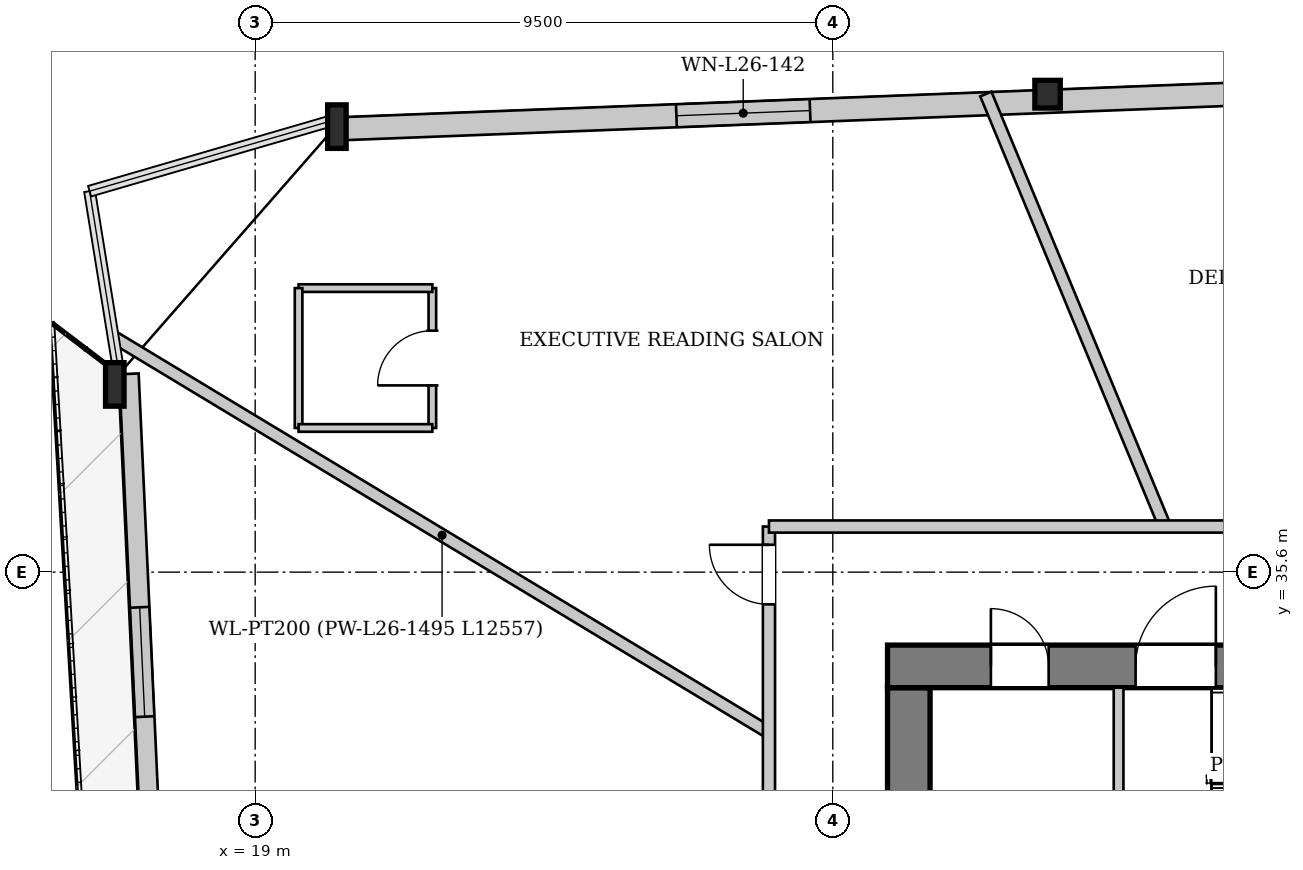
"""IFC4 building model, lengths in metres.
Left out: names, types, materials, properties, quantities, classifications, styles, units other than length and angle.
Written with IfcOpenShell. Run it as: python <this file> out.ifc"""

import sys

from ifc_helpers import new_model, si_unit, direction, frame, frame_2d, origin, origin_2d, place, context, subcontext, project, spatial, rectangle, i_section, extrude, source, transform, mapped, element, fill, save


model = new_model("IFC4")
c1 = context("Model", 3, precision=1e-05, world=origin(), true_north=direction((0.0, 1.0)))
c2 = subcontext(c1, "Body", "Model", "MODEL_VIEW")
j1 = project(units=[si_unit("LENGTHUNIT", "METRE"), si_unit("PLANEANGLEUNIT", "RADIAN")], contexts=[c1])
p1 = place(None, origin())
s1 = spatial("IfcSite", under=j1, at=p1, CompositionType="ELEMENT")
p2 = place(p1, origin())
s2 = spatial("IfcBuilding", under=s1, at=p2, CompositionType="ELEMENT")
p3 = place(p2, frame((0.0, 0.0, 102.15)))
s3 = spatial("IfcBuildingStorey", under=s2, at=p3, CompositionType="ELEMENT", Elevation=102.15)
m1 = source(origin(), c2, "Body", "SweptSolid", [
    extrude(i_section(OverallWidth=0.418, OverallDepth=0.455, WebThickness=0.038, FlangeThickness=0.059, at=origin_2d()), origin(), (0.0, 0.0, 1.0), 3.399),
])
p4 = place(p3, frame((32.167, 43.537, 0.0), z_axis=(-0.079291660334, -0.045463424811, 0.995814194318), x_axis=(0.497407768094, -0.86751686568, 0.0)))
e1 = element("IfcColumn", 1, at=p4, inside=s3, PredefinedType="COLUMN", context=c2, shape_type="MappedRepresentation", body=[
    mapped(m1, transform((0.0, 0.0, 0.0), x_axis=(1.0, 0.0, 0.0), y_axis=(0.0, 1.0, 0.0), z_axis=(0.0, 0.0, 1.0), scale=1.0)),
])
m2 = source(origin(), c2, "Body", "SweptSolid", [
    extrude(i_section(OverallWidth=0.304, OverallDepth=0.716, WebThickness=0.021, FlangeThickness=0.04, at=origin_2d()), origin(), (0.0, 0.0, 1.0), 3.408),
])
p5 = place(p3, frame((20.467, 43.084, 0.0), z_axis=(-0.072200444208, -0.092256123155, 0.993114244987), x_axis=(0.787505001008, -0.616308261658, 0.0)))
e2 = element("IfcColumn", 2, at=p5, inside=s3, PredefinedType="COLUMN", context=c2, shape_type="MappedRepresentation", body=[
    mapped(m2, transform((0.0, 0.0, 0.0), x_axis=(1.0, 0.0, 0.0), y_axis=(0.0, 1.0, 0.0), z_axis=(0.0, 0.0, 1.0), scale=1.0)),
])
m3 = source(origin(), c2, "Body", "SweptSolid", [
    extrude(i_section(OverallWidth=0.304, OverallDepth=0.716, WebThickness=0.021, FlangeThickness=0.04, at=origin_2d()), origin(), (0.0, 0.0, 1.0), 3.404),
])
p6 = place(p3, frame((16.764, 38.853, 0.0), z_axis=(-0.042670244367, -0.097460272428, 0.994324265793), x_axis=(0.916049009684, -0.40106634346, 0.0)))
e3 = element("IfcColumn", 3, at=p6, inside=s3, PredefinedType="COLUMN", context=c2, shape_type="MappedRepresentation", body=[
    mapped(m3, transform((0.0, 0.0, 0.0), x_axis=(1.0, 0.0, 0.0), y_axis=(0.0, 1.0, 0.0), z_axis=(0.0, 0.0, 1.0), scale=1.0)),
])
p7 = place(p3, frame((17.762, 20.637, 0.0), z_axis=(0.0, 0.0, 1.0), x_axis=(-0.04595581603, 0.998943473362, 0.0)))
e4 = element("IfcWall", 4, at=p7, inside=s3, PredefinedType="SOLIDWALL", context=c2, shape_type="SweptSolid", body=[
    extrude(rectangle(XDim=18.243, YDim=0.32, at=frame_2d((9.122, 0.0))), origin(), (0.0, 0.0, 1.0), 2.692),
])
p8 = place(p7, frame((5.288, 0.0, 0.0)))
e5 = element("IfcOpeningElement", 5, at=p8, cuts=e4, PredefinedType="OPENING", context=c2, shape_type="SweptSolid", body=[
    extrude(rectangle(XDim=1.1, YDim=2.3, at=frame_2d((0.55, 1.15))), frame((0.0, 0.17, 0.0), z_axis=(0.0, -1.0, 0.0), x_axis=(1.0, 0.0, 0.0)), (0.0, 0.0, 1.0), 0.34),
])
p9 = place(p7, frame((12.6, 0.0, 0.372)))
e6 = element("IfcOpeningElement", 6, at=p9, cuts=e4, PredefinedType="OPENING", context=c2, shape_type="SweptSolid", body=[
    extrude(rectangle(XDim=1.8, YDim=2.2, at=frame_2d((0.9, 1.1))), frame((0.0, 0.17, 0.0), z_axis=(0.0, -1.0, 0.0), x_axis=(1.0, 0.0, 0.0)), (0.0, 0.0, 1.0), 0.34),
])
p10 = place(p3, frame((20.475, 42.894, 0.0), z_axis=(0.0, 0.0, 1.0), x_axis=(0.999249191087, 0.038743439593, 0.0)))
e7 = element("IfcWall", 7, at=p10, inside=s3, PredefinedType="SOLIDWALL", context=c2, shape_type="SweptSolid", body=[
    extrude(rectangle(XDim=23.416, YDim=0.38, at=frame_2d((11.708, 0.0))), origin(), (0.0, 0.0, 1.0), 2.692),
])
p11 = place(p10, frame((5.457, 0.0, 0.322)))
e8 = element("IfcOpeningElement", 8, at=p11, cuts=e7, PredefinedType="OPENING", context=c2, shape_type="SweptSolid", body=[
    extrude(rectangle(XDim=2.2, YDim=2.25, at=frame_2d((1.1, 1.125))), frame((0.0, 0.2, 0.0), z_axis=(0.0, -1.0, 0.0), x_axis=(1.0, 0.0, 0.0)), (0.0, 0.0, 1.0), 0.4),
])
p12 = place(p10, frame((15.76, 0.0, 0.322)))
e9 = element("IfcOpeningElement", 9, at=p12, cuts=e7, PredefinedType="OPENING", context=c2, shape_type="SweptSolid", body=[
    extrude(rectangle(XDim=2.2, YDim=2.25, at=frame_2d((1.1, 1.125))), frame((0.0, 0.2, 0.0), z_axis=(0.0, -1.0, 0.0), x_axis=(1.0, 0.0, 0.0)), (0.0, 0.0, 1.0), 0.4),
])
p13 = place(p3, frame((29.75, 19.5, 0.0), z_axis=(0.0, 0.0, 1.0), x_axis=(0.0, 1.0, 0.0)))
e10 = element("IfcWall", 10, at=p13, inside=s3, PredefinedType="SHEAR", context=c2, shape_type="SweptSolid", body=[
    extrude(rectangle(XDim=14.2, YDim=0.7, at=frame_2d((7.1, 0.0))), origin(), (0.0, 0.0, 1.0), 3.3),
])
p14 = place(p13, frame((7.42, 0.0, 0.0)))
e11 = element("IfcOpeningElement", 11, at=p14, cuts=e10, PredefinedType="OPENING", context=c2, shape_type="SweptSolid", body=[
    extrude(rectangle(XDim=1.6, YDim=2.2, at=frame_2d((0.8, 1.1))), frame((0.0, 0.36, 0.0), z_axis=(0.0, -1.0, 0.0), x_axis=(1.0, 0.0, 0.0)), (0.0, 0.0, 1.0), 0.72),
])
p15 = place(p3, frame((29.4, 34.05, 0.0), z_axis=(0.0, 0.0, 1.0), x_axis=(1.0, 0.0, 0.0)))
e12 = element("IfcWall", 12, at=p15, inside=s3, PredefinedType="SHEAR", context=c2, shape_type="SweptSolid", body=[
    extrude(rectangle(XDim=17.2, YDim=0.7, at=frame_2d((8.6, 0.0))), origin(), (0.0, 0.0, 1.0), 3.3),
])
p16 = place(p15, frame((1.7, 0.0, 0.0)))
e13 = element("IfcOpeningElement", 13, at=p16, cuts=e12, PredefinedType="OPENING", context=c2, shape_type="SweptSolid", body=[
    extrude(rectangle(XDim=0.95, YDim=2.1, at=frame_2d((0.475, 1.05))), frame((0.0, 0.36, 0.0), z_axis=(0.0, -1.0, 0.0), x_axis=(1.0, 0.0, 0.0)), (0.0, 0.0, 1.0), 0.72),
])
p17 = place(p15, frame((4.08, 0.0, 0.0)))
e14 = element("IfcOpeningElement", 14, at=p17, cuts=e12, PredefinedType="OPENING", context=c2, shape_type="SweptSolid", body=[
    extrude(rectangle(XDim=1.32, YDim=2.2, at=frame_2d((0.66, 1.1))), frame((0.0, 0.36, 0.0), z_axis=(0.0, -1.0, 0.0), x_axis=(1.0, 0.0, 0.0)), (0.0, 0.0, 1.0), 0.72),
])
p18 = place(p15, frame((15.15, 0.0, 0.0)))
e15 = element("IfcOpeningElement", 15, at=p18, cuts=e12, PredefinedType="OPENING", context=c2, shape_type="SweptSolid", body=[
    extrude(rectangle(XDim=0.95, YDim=2.1, at=frame_2d((0.475, 1.05))), frame((0.0, 0.36, 0.0), z_axis=(0.0, -1.0, 0.0), x_axis=(1.0, 0.0, 0.0)), (0.0, 0.0, 1.0), 0.72),
])
p19 = place(p3, frame((33.2, 28.44, 0.0), z_axis=(0.0, 0.0, 1.0), x_axis=(0.0, 1.0, 0.0)))
e16 = element("IfcWall", 16, at=p19, inside=s3, PredefinedType="PARTITIONING", context=c2, shape_type="SweptSolid", body=[
    extrude(rectangle(XDim=5.26, YDim=0.16, at=frame_2d((2.63, 0.0))), origin(), (0.0, 0.0, 1.0), 3.3),
])
p20 = place(p3, frame((27.45, 32.964, 0.0), z_axis=(0.0, 0.0, 1.0), x_axis=(-0.856263872534, 0.516538653533, 0.0)))
e17 = element("IfcWall", 17, at=p20, inside=s3, PredefinedType="PARTITIONING", context=c2, shape_type="SweptSolid", body=[
    extrude(rectangle(XDim=12.557, YDim=0.2, at=frame_2d((6.278, 0.0))), origin(), (0.0, 0.0, 1.0), 3.3),
])
p21 = place(p3, frame((33.962, 36.35, 0.0), z_axis=(0.0, 0.0, 1.0), x_axis=(-0.382610403036, 0.923909778868, 0.0)))
e18 = element("IfcWall", 18, at=p21, inside=s3, PredefinedType="PARTITIONING", context=c2, shape_type="SweptSolid", body=[
    extrude(rectangle(XDim=7.698, YDim=0.2, at=frame_2d((3.849, 0.0))), origin(), (0.0, 0.0, 1.0), 3.3),
])
p22 = place(p3, frame((21.914, 37.971, 0.0), z_axis=(0.0, 0.0, 1.0), x_axis=(0.0, 1.0, 0.0)))
e19 = element("IfcWall", 19, at=p22, inside=s3, PredefinedType="PARTITIONING", context=c2, shape_type="SweptSolid", body=[
    extrude(rectangle(XDim=2.3, YDim=0.125, at=frame_2d((1.15, 0.0))), origin(), (0.0, 0.0, 1.0), 3.3),
])
p23 = place(p22, frame((0.7, 0.0, 0.0)))
e20 = element("IfcOpeningElement", 20, at=p23, cuts=e19, PredefinedType="OPENING", context=c2, shape_type="SweptSolid", body=[
    extrude(rectangle(XDim=0.9, YDim=2.1, at=frame_2d((0.45, 1.05))), frame((0.0, 0.073, 0.0), z_axis=(0.0, -1.0, 0.0), x_axis=(1.0, 0.0, 0.0)), (0.0, 0.0, 1.0), 0.145),
])
p24 = place(p3, frame((21.914, 40.271, 0.0), z_axis=(0.0, 0.0, 1.0), x_axis=(-1.0, 0.0, 0.0)))
e21 = element("IfcWall", 21, at=p24, inside=s3, PredefinedType="PARTITIONING", context=c2, shape_type="SweptSolid", body=[
    extrude(rectangle(XDim=2.2, YDim=0.125, at=frame_2d((1.1, 0.0))), origin(), (0.0, 0.0, 1.0), 3.3),
])
p25 = place(p3, frame((19.714, 40.271, 0.0), z_axis=(0.0, 0.0, 1.0), x_axis=(0.0, -1.0, 0.0)))
e22 = element("IfcWall", 22, at=p25, inside=s3, PredefinedType="PARTITIONING", context=c2, shape_type="SweptSolid", body=[
    extrude(rectangle(XDim=2.3, YDim=0.125, at=frame_2d((1.15, 0.0))), origin(), (0.0, 0.0, 1.0), 3.3),
])
p26 = place(p3, frame((19.714, 37.971, 0.0), z_axis=(0.0, 0.0, 1.0), x_axis=(1.0, 0.0, 0.0)))
e23 = element("IfcWall", 23, at=p26, inside=s3, PredefinedType="PARTITIONING", context=c2, shape_type="SweptSolid", body=[
    extrude(rectangle(XDim=2.2, YDim=0.125, at=frame_2d((1.1, 0.0))), origin(), (0.0, 0.0, 1.0), 3.3),
])
p27 = place(p3, frame((27.45, 16.85, 0.0), z_axis=(0.0, 0.0, 1.0), x_axis=(0.0, 1.0, 0.0)))
e24 = element("IfcWall", 24, at=p27, inside=s3, PredefinedType="PARTITIONING", context=c2, shape_type="SweptSolid", body=[
    extrude(rectangle(XDim=19.5, YDim=0.2, at=frame_2d((9.75, 0.0))), origin(), (0.0, 0.0, 1.0), 3.3),
])
p28 = place(p27, frame((18.22, 0.0, 0.0)))
e25 = element("IfcOpeningElement", 25, at=p28, cuts=e24, PredefinedType="OPENING", context=c2, shape_type="SweptSolid", body=[
    extrude(rectangle(XDim=0.98, YDim=2.15, at=frame_2d((0.49, 1.075))), frame((0.0, 0.11, 0.0), z_axis=(0.0, -1.0, 0.0), x_axis=(1.0, 0.0, 0.0)), (0.0, 0.0, 1.0), 0.22),
])
p29 = place(p3, frame((27.45, 36.35, 0.0), z_axis=(0.0, 0.0, 1.0), x_axis=(1.0, 0.0, 0.0)))
e26 = element("IfcWall", 26, at=p29, inside=s3, PredefinedType="PARTITIONING", context=c2, shape_type="SweptSolid", body=[
    extrude(rectangle(XDim=21.1, YDim=0.2, at=frame_2d((10.55, 0.0))), origin(), (0.0, 0.0, 1.0), 3.3),
])
p30 = place(p29, frame((19.82, 0.0, 0.0)))
e27 = element("IfcOpeningElement", 27, at=p30, cuts=e26, PredefinedType="OPENING", context=c2, shape_type="SweptSolid", body=[
    extrude(rectangle(XDim=0.98, YDim=2.15, at=frame_2d((0.49, 1.075))), frame((0.0, 0.11, 0.0), z_axis=(0.0, -1.0, 0.0), x_axis=(1.0, 0.0, 0.0)), (0.0, 0.0, 1.0), 0.22),
])
p31 = place(p29, frame((8.513, 0.0, 0.0)))
e28 = element("IfcOpeningElement", 28, at=p31, cuts=e26, PredefinedType="OPENING", context=c2, shape_type="SweptSolid", body=[
    extrude(rectangle(XDim=0.98, YDim=2.15, at=frame_2d((0.49, 1.075))), frame((0.0, 0.11, 0.0), z_axis=(0.0, -1.0, 0.0), x_axis=(1.0, 0.0, 0.0)), (0.0, 0.0, 1.0), 0.22),
])
m4 = source(origin(), c2, "Body", "SweptSolid", [
    extrude(rectangle(XDim=1.8, YDim=2.2, at=frame_2d((0.9, 1.1))), frame((0.0, 0.03, 0.0), z_axis=(0.0, -1.0, 0.0), x_axis=(1.0, 0.0, 0.0)), (0.0, 0.0, 1.0), 0.06),
])
p32 = place(p9, origin())
e29 = element("IfcWindow", 29, at=p32, inside=s3, PartitioningType="SINGLE_PANEL", PredefinedType="WINDOW", context=c2, shape_type="MappedRepresentation", body=[
    mapped(m4, transform((0.0, 0.0, 0.0), x_axis=(1.0, 0.0, 0.0), y_axis=(0.0, 1.0, 0.0), z_axis=(0.0, 0.0, 1.0), scale=1.0)),
])
fill(e6, e29)
m5 = source(origin(), c2, "Body", "SweptSolid", [
    extrude(rectangle(XDim=2.2, YDim=2.25, at=frame_2d((1.1, 1.125))), frame((0.0, 0.03, 0.0), z_axis=(0.0, -1.0, 0.0), x_axis=(1.0, 0.0, 0.0)), (0.0, 0.0, 1.0), 0.06),
])
p33 = place(p11, origin())
e30 = element("IfcWindow", 30, at=p33, inside=s3, PartitioningType="SINGLE_PANEL", PredefinedType="WINDOW", context=c2, shape_type="MappedRepresentation", body=[
    mapped(m5, transform((0.0, 0.0, 0.0), x_axis=(1.0, 0.0, 0.0), y_axis=(0.0, 1.0, 0.0), z_axis=(0.0, 0.0, 1.0), scale=1.0)),
])
fill(e8, e30)
m6 = source(origin(), c2, "Body", "SweptSolid", [
    extrude(rectangle(XDim=0.95, YDim=2.1, at=frame_2d((0.475, 1.05))), frame((0.0, 0.025, 0.0), z_axis=(0.0, -1.0, 0.0), x_axis=(1.0, 0.0, 0.0)), (0.0, 0.0, 1.0), 0.05),
])
p34 = place(p16, origin())
e31 = element("IfcDoor", 31, at=p34, inside=s3, OperationType="SINGLE_SWING_LEFT", PredefinedType="DOOR", context=c2, shape_type="MappedRepresentation", body=[
    mapped(m6, transform((0.0, 0.0, 0.0), x_axis=(1.0, 0.0, 0.0), y_axis=(0.0, 1.0, 0.0), z_axis=(0.0, 0.0, 1.0), scale=1.0)),
])
fill(e13, e31)
m7 = source(origin(), c2, "Body", "SweptSolid", [
    extrude(rectangle(XDim=1.32, YDim=2.2, at=frame_2d((0.66, 1.1))), frame((0.0, 0.025, 0.0), z_axis=(0.0, -1.0, 0.0), x_axis=(1.0, 0.0, 0.0)), (0.0, 0.0, 1.0), 0.05),
])
p35 = place(p17, origin())
e32 = element("IfcDoor", 32, at=p35, inside=s3, OperationType="SINGLE_SWING_RIGHT", PredefinedType="DOOR", context=c2, shape_type="MappedRepresentation", body=[
    mapped(m7, transform((0.0, 0.0, 0.0), x_axis=(1.0, 0.0, 0.0), y_axis=(0.0, 1.0, 0.0), z_axis=(0.0, 0.0, 1.0), scale=1.0)),
])
fill(e14, e32)
m8 = source(origin(), c2, "Body", "SweptSolid", [
    extrude(rectangle(XDim=0.9, YDim=2.1, at=frame_2d((0.45, 1.05))), frame((0.0, 0.025, 0.0), z_axis=(0.0, -1.0, 0.0), x_axis=(1.0, 0.0, 0.0)), (0.0, 0.0, 1.0), 0.05),
])
p36 = place(p23, origin())
e33 = element("IfcDoor", 33, at=p36, inside=s3, OperationType="SINGLE_SWING_LEFT", PredefinedType="DOOR", context=c2, shape_type="MappedRepresentation", body=[
    mapped(m8, transform((0.0, 0.0, 0.0), x_axis=(1.0, 0.0, 0.0), y_axis=(0.0, 1.0, 0.0), z_axis=(0.0, 0.0, 1.0), scale=1.0)),
])
fill(e20, e33)
m9 = source(origin(), c2, "Body", "SweptSolid", [
    extrude(rectangle(XDim=0.98, YDim=2.15, at=frame_2d((0.49, 1.075))), frame((0.0, 0.025, 0.0), z_axis=(0.0, -1.0, 0.0), x_axis=(1.0, 0.0, 0.0)), (0.0, 0.0, 1.0), 0.05),
])
p37 = place(p28, origin())
e34 = element("IfcDoor", 34, at=p37, inside=s3, OperationType="SINGLE_SWING_RIGHT", PredefinedType="DOOR", context=c2, shape_type="MappedRepresentation", body=[
    mapped(m9, transform((0.0, 0.0, 0.0), x_axis=(1.0, 0.0, 0.0), y_axis=(0.0, 1.0, 0.0), z_axis=(0.0, 0.0, 1.0), scale=1.0)),
])
fill(e25, e34)
save(model, sys.argv[1])
